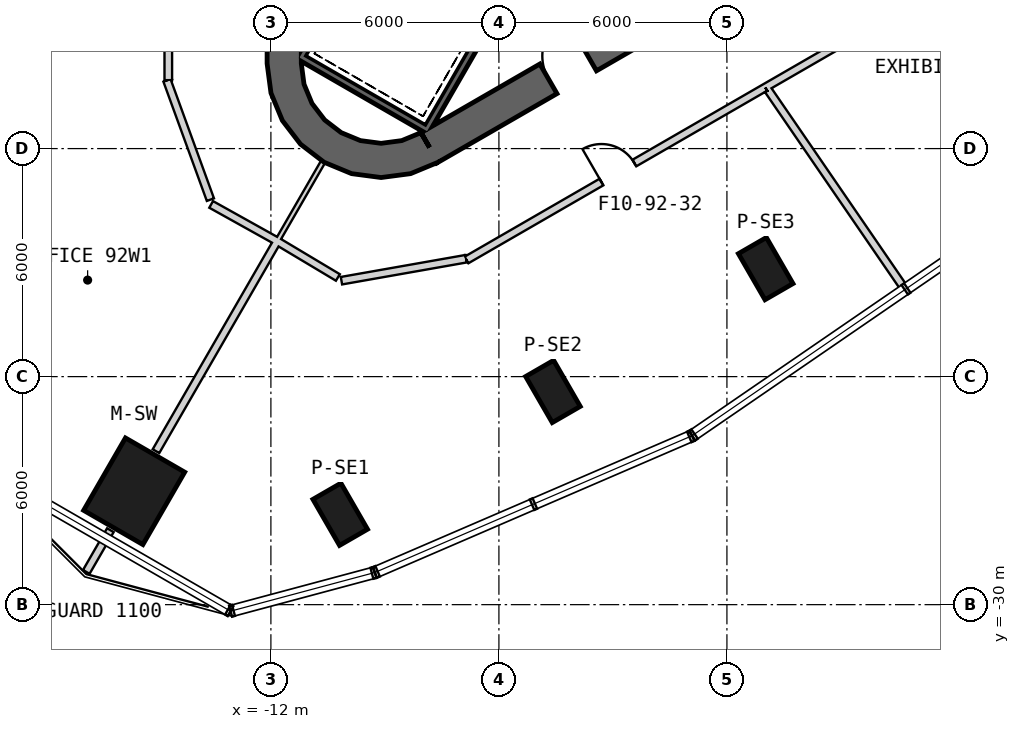
"""IFC4 building model, lengths in metres.
Left out: names, types, materials, properties, quantities, classifications, styles, units other than length and angle.
Written with IfcOpenShell. Run it as: python <this file> out.ifc"""

import sys

from ifc_helpers import new_model, si_unit, direction, frame, frame_2d, origin, origin_2d, place, context, subcontext, project, spatial, polyline, rectangle, outline, extrude, element, fill, save


model = new_model("IFC4")
c1 = context("Model", 3, precision=1e-05, world=origin(), true_north=direction((0.0, 1.0)))
c2 = subcontext(c1, "Body", "Model", "MODEL_VIEW")
j1 = project(units=[si_unit("LENGTHUNIT", "METRE"), si_unit("PLANEANGLEUNIT", "RADIAN")], contexts=[c1])
p1 = place(None, origin())
s1 = spatial("IfcSite", under=j1, at=p1, CompositionType="ELEMENT")
p2 = place(p1, origin())
s2 = spatial("IfcBuilding", under=s1, at=p2, CompositionType="ELEMENT")
p3 = place(p2, frame((0.0, 0.0, 404.8)))
s3 = spatial("IfcBuildingStorey", under=s2, at=p3, CompositionType="ELEMENT", Elevation=404.8)
p4 = place(p3, frame((-15.598, -27.016, 0.0), z_axis=(0.0, 0.0, 1.0), x_axis=(-0.5, -0.866025403784, 0.0)))
e1 = element("IfcColumn", 1, at=p4, inside=s3, PredefinedType="COLUMN", context=c2, shape_type="SweptSolid", body=[
    extrude(rectangle(XDim=2.2, YDim=1.8, at=origin_2d()), origin(), (0.0, 0.0, 1.0), 5.25),
])
for number, where, z_axis, x_axis in (
    (2, (-10.176, -27.623, 0.0), (0.0, 0.0, 1.0), (0.5, -0.866, 0.0)),
    (3, (-4.578, -24.391, 0.0), (0.0, 0.0, 1.0), (0.5, -0.866, 0.0)),
    (4, (1.02, -21.159, 0.0), (0.0, 0.0, 1.0), (0.5, -0.866, 0.0)),
):
    element("IfcColumn", number, at=place(p3, frame(where, z_axis=z_axis, x_axis=x_axis)), inside=s3, PredefinedType="COLUMN", context=c2, shape_type="SweptSolid", body=[
        extrude(rectangle(XDim=1.4, YDim=0.85, at=origin_2d()), origin(), (0.0, 0.0, 1.0), 5.25),
    ])
p5 = place(p3, frame((-11.65, 15.762, 0.0), z_axis=(0.0, 0.0, 1.0), x_axis=(0.0, -1.0, 0.0)))
e5 = element("IfcWall", 5, at=p5, inside=s3, PredefinedType="SHEAR", context=c2, shape_type="SweptSolid", body=[
    extrude(rectangle(XDim=31.523, YDim=0.9, at=frame_2d((15.762, 0.0))), origin(), (0.0, 0.0, 1.0), 5.5),
])
p6 = place(p5, frame((3.612, 0.0, 0.0)))
e6 = element("IfcOpeningElement", 6, at=p6, cuts=e5, PredefinedType="OPENING", context=c2, shape_type="SweptSolid", body=[
    extrude(rectangle(XDim=1.2, YDim=2.4, at=frame_2d((0.6, 1.2))), frame((0.0, 0.46, 0.0), z_axis=(0.0, -1.0, 0.0), x_axis=(1.0, 0.0, 0.0)), (0.0, 0.0, 1.0), 0.92),
])
p7 = place(p5, frame((26.712, 0.0, 0.0)))
e7 = element("IfcOpeningElement", 7, at=p7, cuts=e5, PredefinedType="OPENING", context=c2, shape_type="SweptSolid", body=[
    extrude(rectangle(XDim=1.2, YDim=2.4, at=frame_2d((0.6, 1.2))), frame((0.0, 0.46, 0.0), z_axis=(0.0, -1.0, 0.0), x_axis=(1.0, 0.0, 0.0)), (0.0, 0.0, 1.0), 0.92),
])
p8 = place(p3, frame((-7.825, -17.97, 0.0), z_axis=(0.0, 0.0, 1.0), x_axis=(0.866028369851, 0.499994862586, 0.0)))
e8 = element("IfcWall", 8, at=p8, inside=s3, PredefinedType="SHEAR", context=c2, shape_type="SweptSolid", body=[
    extrude(rectangle(XDim=31.523, YDim=0.9, at=frame_2d((15.762, 0.0))), origin(), (0.0, 0.0, 1.0), 5.5),
])
p9 = place(p8, frame((7.062, 0.0, 0.0)))
e9 = element("IfcOpeningElement", 9, at=p9, cuts=e8, PredefinedType="OPENING", context=c2, shape_type="SweptSolid", body=[
    extrude(rectangle(XDim=1.2, YDim=2.4, at=frame_2d((0.6, 1.2))), frame((0.0, 0.46, 0.0), z_axis=(0.0, -1.0, 0.0), x_axis=(1.0, 0.0, 0.0)), (0.0, 0.0, 1.0), 0.92),
])
p10 = place(p8, frame((9.762, 0.0, 0.0)))
e10 = element("IfcOpeningElement", 10, at=p10, cuts=e8, PredefinedType="OPENING", context=c2, shape_type="SweptSolid", body=[
    extrude(rectangle(XDim=1.2, YDim=2.4, at=frame_2d((0.6, 1.2))), frame((0.0, 0.46, 0.0), z_axis=(0.0, -1.0, 0.0), x_axis=(1.0, 0.0, 0.0)), (0.0, 0.0, 1.0), 0.92),
])
p11 = place(p8, frame((17.862, 0.0, 0.0)))
e11 = element("IfcOpeningElement", 11, at=p11, cuts=e8, PredefinedType="OPENING", context=c2, shape_type="SweptSolid", body=[
    extrude(rectangle(XDim=1.2, YDim=2.4, at=frame_2d((0.6, 1.2))), frame((0.0, 0.46, 0.0), z_axis=(0.0, -1.0, 0.0), x_axis=(1.0, 0.0, 0.0)), (0.0, 0.0, 1.0), 0.92),
])
p12 = place(p8, frame((20.562, 0.0, 0.0)))
e12 = element("IfcOpeningElement", 12, at=p12, cuts=e8, PredefinedType="OPENING", context=c2, shape_type="SweptSolid", body=[
    extrude(rectangle(XDim=1.2, YDim=2.4, at=frame_2d((0.6, 1.2))), frame((0.0, 0.46, 0.0), z_axis=(0.0, -1.0, 0.0), x_axis=(1.0, 0.0, 0.0)), (0.0, 0.0, 1.0), 0.92),
])
p13 = place(p8, frame((26.712, 0.0, 0.0)))
e13 = element("IfcOpeningElement", 13, at=p13, cuts=e8, PredefinedType="OPENING", context=c2, shape_type="SweptSolid", body=[
    extrude(rectangle(XDim=1.2, YDim=2.4, at=frame_2d((0.6, 1.2))), frame((0.0, 0.46, 0.0), z_axis=(0.0, -1.0, 0.0), x_axis=(1.0, 0.0, 0.0)), (0.0, 0.0, 1.0), 0.92),
])
p14 = place(p8, frame((3.612, 0.0, 0.0)))
e14 = element("IfcOpeningElement", 14, at=p14, cuts=e8, PredefinedType="OPENING", context=c2, shape_type="SweptSolid", body=[
    extrude(rectangle(XDim=1.2, YDim=2.4, at=frame_2d((0.6, 1.2))), frame((0.0, 0.46, 0.0), z_axis=(0.0, -1.0, 0.0), x_axis=(1.0, 0.0, 0.0)), (0.0, 0.0, 1.0), 0.92),
])
p15 = place(p3, origin())
e15 = element("IfcWall", 15, at=p15, inside=s3, PredefinedType="SHEAR", context=c2, shape_type="SweptSolid", body=[
    extrude(outline(polyline([(-12.1, -15.762), (-11.998, -16.538), (-11.698, -17.262), (-11.221, -17.883), (-10.6, -18.36), (-9.876, -18.659), (-9.1, -18.762), (-8.323, -18.659), (-7.6, -18.36), (-8.05, -17.58), (-8.556, -17.79), (-9.1, -17.862), (-9.644, -17.79), (-10.15, -17.58), (-10.585, -17.247), (-10.919, -16.812), (-11.128, -16.305), (-11.2, -15.762), (-12.1, -15.762)])), origin(), (0.0, 0.0, 1.0), 5.5),
])
p16 = place(p3, frame((-3.905, -10.563, -0.3), z_axis=(0.0, 0.0, 1.0), x_axis=(-0.500012932018, -0.866017937352, 0.0)))
e16 = element("IfcWall", 16, at=p16, inside=s3, PredefinedType="SHEAR", context=c2, shape_type="SweptSolid", body=[
    extrude(rectangle(XDim=8.1, YDim=0.2, at=frame_2d((4.05, 0.0))), origin(), (0.0, 0.0, 1.0), 5.55),
])
p17 = place(p3, frame((-11.282, -15.541, -0.3), z_axis=(0.0, 0.0, 1.0), x_axis=(0.866000483506, -0.500043160704, 0.0)))
e17 = element("IfcWall", 17, at=p17, inside=s3, PredefinedType="SHEAR", context=c2, shape_type="SweptSolid", body=[
    extrude(rectangle(XDim=3.8, YDim=0.2, at=frame_2d((1.9, 0.0))), origin(), (0.0, 0.0, 1.0), 5.55),
])
p18 = place(p3, frame((-7.196, -8.663, -0.3), z_axis=(0.0, 0.0, 1.0), x_axis=(-0.499997992926, -0.866026562566, 0.0)))
e18 = element("IfcWall", 18, at=p18, inside=s3, PredefinedType="SHEAR", context=c2, shape_type="SweptSolid", body=[
    extrude(rectangle(XDim=7.9, YDim=0.2, at=frame_2d((3.95, 0.0))), origin(), (0.0, 0.0, 1.0), 5.55),
])
p19 = place(p3, frame((-14.7, -6.295, 0.0), z_axis=(0.0, 0.0, 1.0), x_axis=(0.0, -1.0, 0.0)))
e19 = element("IfcWall", 19, at=p19, inside=s3, PredefinedType="PARTITIONING", context=c2, shape_type="SweptSolid", body=[
    extrude(rectangle(XDim=9.905, YDim=0.2, at=frame_2d((4.952, 0.0))), origin(), (0.0, 0.0, 1.0), 5.25),
])
p20 = place(p19, frame((4.456, 0.0, 0.0)))
e20 = element("IfcOpeningElement", 20, at=p20, cuts=e19, PredefinedType="OPENING", context=c2, shape_type="SweptSolid", body=[
    extrude(rectangle(XDim=1.0, YDim=2.1, at=frame_2d((0.5, 1.05))), frame((0.0, 0.11, 0.0), z_axis=(0.0, -1.0, 0.0), x_axis=(1.0, 0.0, 0.0)), (0.0, 0.0, 1.0), 0.22),
])
p21 = place(p3, frame((-13.572, -19.469, 0.0), z_axis=(0.0, 0.0, 1.0), x_axis=(0.873512168958, -0.486802311707, 0.0)))
e21 = element("IfcWall", 21, at=p21, inside=s3, PredefinedType="PARTITIONING", context=c2, shape_type="SweptSolid", body=[
    extrude(rectangle(XDim=2.02, YDim=0.2, at=frame_2d((1.01, 0.0))), origin(), (0.0, 0.0, 1.0), 3.02),
])
p22 = place(p3, frame((-14.734, -16.206, 0.0), z_axis=(0.0, 0.0, 1.0), x_axis=(0.342013079247, -0.93969519187, 0.0)))
e22 = element("IfcWall", 22, at=p22, inside=s3, PredefinedType="PARTITIONING", context=c2, shape_type="SweptSolid", body=[
    extrude(rectangle(XDim=3.339, YDim=0.2, at=frame_2d((1.67, 0.0))), origin(), (0.0, 0.0, 1.0), 5.25),
])
p23 = place(p3, frame((-10.549, -18.212, 0.0), z_axis=(0.0, 0.0, 1.0), x_axis=(-0.500047596559, -0.865997922154, 0.0)))
e23 = element("IfcWall", 23, at=p23, inside=s3, PredefinedType="PARTITIONING", context=c2, shape_type="SweptSolid", body=[
    extrude(rectangle(XDim=2.6, YDim=0.12, at=frame_2d((1.3, 0.0))), origin(), (0.0, 0.0, 1.0), 3.02),
])
p24 = place(p3, frame((-11.849, -20.463, 0.0), z_axis=(0.0, 0.0, 1.0), x_axis=(-0.499993152284, -0.866029357279, 0.0)))
e24 = element("IfcWall", 24, at=p24, inside=s3, PredefinedType="PARTITIONING", context=c2, shape_type="SweptSolid", body=[
    extrude(rectangle(XDim=6.35, YDim=0.2, at=frame_2d((3.175, 0.0))), origin(), (0.0, 0.0, 1.0), 3.02),
])
p25 = place(p3, frame((-16.224, -28.041, 0.0), z_axis=(0.0, 0.0, 1.0), x_axis=(-0.499950289094, -0.866054102487, 0.0)))
e25 = element("IfcWall", 25, at=p25, inside=s3, PredefinedType="PARTITIONING", context=c2, shape_type="SweptSolid", body=[
    extrude(rectangle(XDim=1.268, YDim=0.2, at=frame_2d((0.634, 0.0))), origin(), (0.0, 0.0, 1.0), 5.25),
])
p26 = place(p3, frame((-6.852, -20.93, 0.0), z_axis=(0.0, 0.0, 1.0), x_axis=(0.866016739626, 0.500015006463, 0.0)))
e26 = element("IfcWall", 26, at=p26, inside=s3, PredefinedType="PARTITIONING", context=c2, shape_type="SweptSolid", body=[
    extrude(rectangle(XDim=9.078, YDim=0.2, at=frame_2d((4.539, 0.0))), origin(), (0.0, 0.0, 1.0), 5.25),
])
p27 = place(p26, frame((4.1, 0.0, 0.0)))
e27 = element("IfcOpeningElement", 27, at=p27, cuts=e26, PredefinedType="OPENING", context=c2, shape_type="SweptSolid", body=[
    extrude(rectangle(XDim=1.0, YDim=2.1, at=frame_2d((0.5, 1.05))), frame((0.0, 0.11, 0.0), z_axis=(0.0, -1.0, 0.0), x_axis=(1.0, 0.0, 0.0)), (0.0, 0.0, 1.0), 0.22),
])
p28 = place(p3, frame((1.009, -16.391, 0.0), z_axis=(0.0, 0.0, 1.0), x_axis=(0.866026744585, 0.499997677658, 0.0)))
e28 = element("IfcWall", 28, at=p28, inside=s3, PredefinedType="PARTITIONING", context=c2, shape_type="SweptSolid", body=[
    extrude(rectangle(XDim=13.617, YDim=0.2, at=frame_2d((6.808, 0.0))), origin(), (0.0, 0.0, 1.0), 5.25),
])
p29 = place(p28, frame((6.456, 0.0, 0.0)))
e29 = element("IfcOpeningElement", 29, at=p29, cuts=e28, PredefinedType="OPENING", context=c2, shape_type="SweptSolid", body=[
    extrude(rectangle(XDim=1.0, YDim=2.1, at=frame_2d((0.5, 1.05))), frame((0.0, 0.11, 0.0), z_axis=(0.0, -1.0, 0.0), x_axis=(1.0, 0.0, 0.0)), (0.0, 0.0, 1.0), 0.22),
])
p30 = place(p3, frame((-10.143, -21.476, 0.0), z_axis=(0.0, 0.0, 1.0), x_axis=(0.98480864774, 0.173643103339, 0.0)))
e30 = element("IfcWall", 30, at=p30, inside=s3, PredefinedType="PARTITIONING", context=c2, shape_type="SweptSolid", body=[
    extrude(rectangle(XDim=3.329, YDim=0.2, at=frame_2d((1.665, 0.0))), origin(), (0.0, 0.0, 1.0), 5.25),
])
p31 = place(p3, frame((-11.808, -20.452, 0.0), z_axis=(0.0, 0.0, 1.0), x_axis=(0.858362923554, -0.51304297234, 0.0)))
e31 = element("IfcWall", 31, at=p31, inside=s3, PredefinedType="PARTITIONING", context=c2, shape_type="SweptSolid", body=[
    extrude(rectangle(XDim=1.83, YDim=0.2, at=frame_2d((0.915, 0.0))), origin(), (0.0, 0.0, 1.0), 3.02),
])
p32 = place(p3, frame((4.688, -21.709, 0.0), z_axis=(0.0, 0.0, 1.0), x_axis=(-0.565893636681, 0.824478254391, 0.0)))
e32 = element("IfcWall", 32, at=p32, inside=s3, PredefinedType="PARTITIONING", context=c2, shape_type="SweptSolid", body=[
    extrude(rectangle(XDim=6.364, YDim=0.2, at=frame_2d((3.182, 0.0))), origin(), (0.0, 0.0, 1.0), 5.25),
])
p33 = place(p27, origin())
e33 = element("IfcDoor", 33, at=p33, inside=s3, OperationType="SINGLE_SWING_LEFT", PredefinedType="USERDEFINED", context=c2, shape_type="SweptSolid", body=[
    extrude(rectangle(XDim=1.0, YDim=2.1, at=frame_2d((0.5, 1.05))), frame((0.0, 0.025, 0.0), z_axis=(0.0, -1.0, 0.0), x_axis=(1.0, 0.0, 0.0)), (0.0, 0.0, 1.0), 0.05),
])
fill(e27, e33)
p34 = place(p14, origin())
e34 = element("IfcDoor", 34, at=p34, inside=s3, OperationType="SINGLE_SWING_RIGHT", PredefinedType="USERDEFINED", context=c2, shape_type="SweptSolid", body=[
    extrude(rectangle(XDim=1.2, YDim=2.4, at=frame_2d((0.6, 1.2))), frame((0.0, 0.025, 0.0), z_axis=(0.0, -1.0, 0.0), x_axis=(1.0, 0.0, 0.0)), (0.0, 0.0, 1.0), 0.05),
])
fill(e14, e34)
save(model, sys.argv[1])
